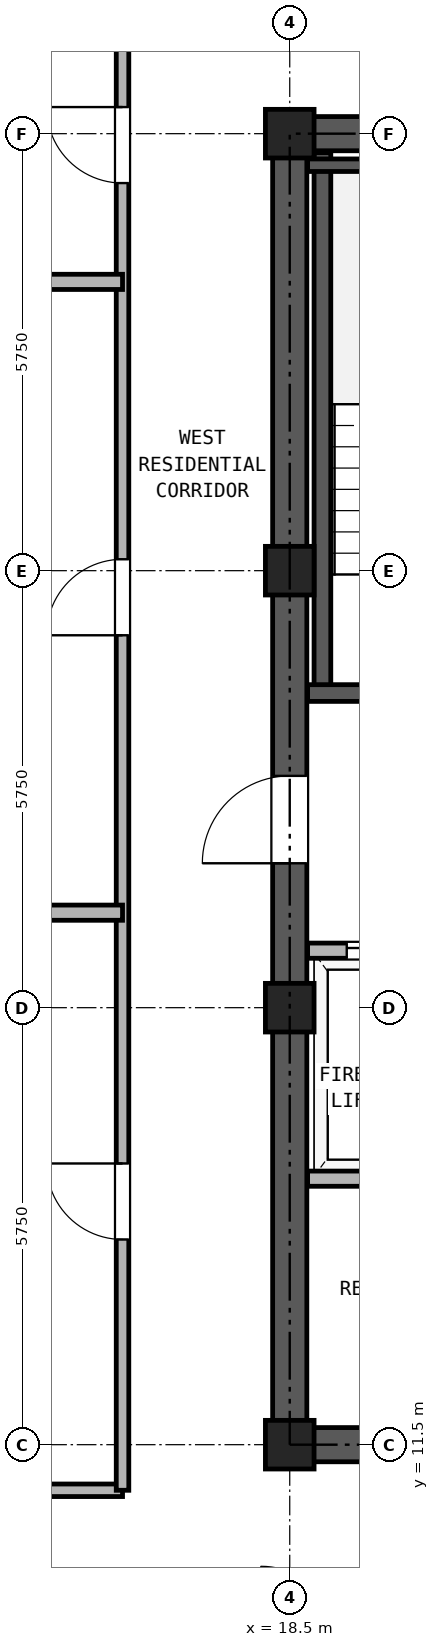
"""IFC4 building model, lengths in metres.
Left out: names, types, materials, properties, quantities, classifications, styles, units other than length and angle.
Written with IfcOpenShell. Run it as: python <this file> out.ifc"""

import sys

from ifc_helpers import new_model, si_unit, direction, frame, frame_2d, origin, origin_2d, place, context, subcontext, project, spatial, rectangle, hollow_rectangle, extrude, source, transform, mapped, element, fill, save


model = new_model("IFC4")
c1 = context("Model", 3, precision=1e-05, world=origin(), true_north=direction((0.0, 1.0)))
c2 = subcontext(c1, "Body", "Model", "MODEL_VIEW")
j1 = project(units=[si_unit("LENGTHUNIT", "METRE"), si_unit("PLANEANGLEUNIT", "RADIAN")], contexts=[c1])
p1 = place(None, origin())
s1 = spatial("IfcSite", under=j1, at=p1, CompositionType="ELEMENT")
p2 = place(p1, origin())
s2 = spatial("IfcBuilding", under=s1, at=p2, CompositionType="ELEMENT")
p3 = place(p2, frame((0.0, 0.0, 159.3)))
s3 = spatial("IfcBuildingStorey", under=s2, at=p3, CompositionType="ELEMENT", Elevation=159.3)
m1 = source(origin(), c2, "Body", "SweptSolid", [
    extrude(hollow_rectangle(XDim=0.64, YDim=0.64, WallThickness=0.035, at=origin_2d()), origin(), (0.0, 0.0, 1.0), 2.95),
])
for number, where, z_axis, x_axis in (
    (1, (18.5, 11.5, 0.0), (0.0, 0.0, 1.0), (1.0, 0.0, 0.0)),
    (2, (18.5, 17.25, 0.0), (0.0, 0.0, 1.0), (1.0, 0.0, 0.0)),
    (3, (18.5, 23.0, 0.0), (0.0, 0.0, 1.0), (1.0, 0.0, 0.0)),
    (4, (18.5, 28.75, 0.0), (0.0, 0.0, 1.0), (1.0, 0.0, 0.0)),
):
    element("IfcColumn", number, at=place(p3, frame(where, z_axis=z_axis, x_axis=x_axis)), inside=s3, PredefinedType="COLUMN", context=c2, shape_type="MappedRepresentation", body=[
        mapped(m1, transform((0.0, 0.0, 0.0), x_axis=(1.0, 0.0, 0.0), y_axis=(0.0, 1.0, 0.0), z_axis=(0.0, 0.0, 1.0), scale=1.0)),
    ])
p4 = place(p3, frame((18.275, 11.5, 0.0), z_axis=(0.0, 0.0, 1.0), x_axis=(1.0, 0.0, 0.0)))
e5 = element("IfcWall", 5, at=p4, inside=s3, PredefinedType="SHEAR", context=c2, shape_type="SweptSolid", body=[
    extrude(rectangle(XDim=10.45, YDim=0.45, at=frame_2d((5.225, 0.0))), origin(), (0.0, 0.0, 1.0), 2.95),
])
p5 = place(p4, frame((1.825, 0.0, 0.0)))
e6 = element("IfcOpeningElement", 6, at=p5, cuts=e5, PredefinedType="OPENING", context=c2, shape_type="SweptSolid", body=[
    extrude(rectangle(XDim=0.95, YDim=2.15, at=frame_2d((0.475, 1.075))), frame((0.0, 0.235, 0.0), z_axis=(0.0, -1.0, 0.0), x_axis=(1.0, 0.0, 0.0)), (0.0, 0.0, 1.0), 0.47),
])
p6 = place(p4, frame((5.325, 0.0, 0.0)))
e7 = element("IfcOpeningElement", 7, at=p6, cuts=e5, PredefinedType="OPENING", context=c2, shape_type="SweptSolid", body=[
    extrude(rectangle(XDim=0.95, YDim=2.15, at=frame_2d((0.475, 1.075))), frame((0.0, 0.235, 0.0), z_axis=(0.0, -1.0, 0.0), x_axis=(1.0, 0.0, 0.0)), (0.0, 0.0, 1.0), 0.47),
])
p7 = place(p4, frame((8.225, 0.0, 0.0)))
e8 = element("IfcOpeningElement", 8, at=p7, cuts=e5, PredefinedType="OPENING", context=c2, shape_type="SweptSolid", body=[
    extrude(rectangle(XDim=1.1, YDim=2.25, at=frame_2d((0.55, 1.125))), frame((0.0, 0.235, 0.0), z_axis=(0.0, -1.0, 0.0), x_axis=(1.0, 0.0, 0.0)), (0.0, 0.0, 1.0), 0.47),
])
p8 = place(p3, frame((18.275, 28.75, 0.0), z_axis=(0.0, 0.0, 1.0), x_axis=(1.0, 0.0, 0.0)))
e9 = element("IfcWall", 9, at=p8, inside=s3, PredefinedType="SHEAR", context=c2, shape_type="SweptSolid", body=[
    extrude(rectangle(XDim=10.45, YDim=0.45, at=frame_2d((5.225, 0.0))), origin(), (0.0, 0.0, 1.0), 2.95),
])
p9 = place(p8, frame((4.105, 0.0, 0.0)))
e10 = element("IfcOpeningElement", 10, at=p9, cuts=e9, PredefinedType="OPENING", context=c2, shape_type="SweptSolid", body=[
    extrude(rectangle(XDim=0.9, YDim=2.05, at=frame_2d((0.45, 1.025))), frame((0.0, 0.235, 0.0), z_axis=(0.0, -1.0, 0.0), x_axis=(1.0, 0.0, 0.0)), (0.0, 0.0, 1.0), 0.47),
])
p10 = place(p8, frame((5.645, 0.0, 0.0)))
e11 = element("IfcOpeningElement", 11, at=p10, cuts=e9, PredefinedType="OPENING", context=c2, shape_type="SweptSolid", body=[
    extrude(rectangle(XDim=0.9, YDim=2.05, at=frame_2d((0.45, 1.025))), frame((0.0, 0.235, 0.0), z_axis=(0.0, -1.0, 0.0), x_axis=(1.0, 0.0, 0.0)), (0.0, 0.0, 1.0), 0.47),
])
p11 = place(p3, frame((18.5, 11.725, 0.0), z_axis=(0.0, 0.0, 1.0), x_axis=(0.0, 1.0, 0.0)))
e12 = element("IfcWall", 12, at=p11, inside=s3, PredefinedType="SHEAR", context=c2, shape_type="SweptSolid", body=[
    extrude(rectangle(XDim=16.8, YDim=0.45, at=frame_2d((8.4, 0.0))), origin(), (0.0, 0.0, 1.0), 2.95),
])
p12 = place(p11, frame((7.425, 0.0, 0.0)))
e13 = element("IfcOpeningElement", 13, at=p12, cuts=e12, PredefinedType="OPENING", context=c2, shape_type="SweptSolid", body=[
    extrude(rectangle(XDim=1.15, YDim=2.2, at=frame_2d((0.575, 1.1))), frame((0.0, 0.235, 0.0), z_axis=(0.0, -1.0, 0.0), x_axis=(1.0, 0.0, 0.0)), (0.0, 0.0, 1.0), 0.47),
])
p13 = place(p3, frame((18.93, 21.39, 0.0), z_axis=(0.0, 0.0, 1.0), x_axis=(0.0, 1.0, 0.0)))
e14 = element("IfcWall", 14, at=p13, inside=s3, PredefinedType="SOLIDWALL", context=c2, shape_type="SweptSolid", body=[
    extrude(rectangle(XDim=7.11, YDim=0.22, at=frame_2d((3.555, 0.0))), origin(), (0.0, 0.0, 1.0), 2.95),
])
p14 = place(p3, frame((18.735, 28.335, 0.0), z_axis=(0.0, 0.0, 1.0), x_axis=(1.0, 0.0, 0.0)))
e15 = element("IfcWall", 15, at=p14, inside=s3, PredefinedType="PARTITIONING", context=c2, shape_type="SweptSolid", body=[
    extrude(rectangle(XDim=3.375, YDim=0.165, at=frame_2d((1.688, 0.0))), origin(), (0.0, 0.0, 1.0), 2.95),
])
p15 = place(p3, frame((18.735, 21.39, 0.0), z_axis=(0.0, 0.0, 1.0), x_axis=(1.0, 0.0, 0.0)))
e16 = element("IfcWall", 16, at=p15, inside=s3, PredefinedType="SOLIDWALL", context=c2, shape_type="SweptSolid", body=[
    extrude(rectangle(XDim=6.395, YDim=0.22, at=frame_2d((3.197, 0.0))), origin(), (0.0, 0.0, 1.0), 2.95),
])
p16 = place(p15, frame((1.115, 0.0, 0.0)))
e17 = element("IfcOpeningElement", 17, at=p16, cuts=e16, PredefinedType="OPENING", context=c2, shape_type="SweptSolid", body=[
    extrude(rectangle(XDim=1.15, YDim=2.2, at=frame_2d((0.575, 1.1))), frame((0.0, 0.12, 0.0), z_axis=(0.0, -1.0, 0.0), x_axis=(1.0, 0.0, 0.0)), (0.0, 0.0, 1.0), 0.24),
])
p17 = place(p15, frame((4.845, 0.0, 0.0)))
e18 = element("IfcOpeningElement", 18, at=p17, cuts=e16, PredefinedType="OPENING", context=c2, shape_type="SweptSolid", body=[
    extrude(rectangle(XDim=1.1, YDim=2.25, at=frame_2d((0.55, 1.125))), frame((0.0, 0.12, 0.0), z_axis=(0.0, -1.0, 0.0), x_axis=(1.0, 0.0, 0.0)), (0.0, 0.0, 1.0), 0.24),
])
p18 = place(p3, frame((18.735, 18.0, 0.0), z_axis=(0.0, 0.0, 1.0), x_axis=(1.0, 0.0, 0.0)))
e19 = element("IfcWall", 19, at=p18, inside=s3, PredefinedType="PARTITIONING", context=c2, shape_type="SweptSolid", body=[
    extrude(rectangle(XDim=9.53, YDim=0.2, at=frame_2d((4.765, 0.0))), origin(), (0.0, 0.0, 1.0), 2.95),
])
p19 = place(p18, frame((0.515, 0.0, 0.0)))
e20 = element("IfcOpeningElement", 20, at=p19, cuts=e19, PredefinedType="OPENING", context=c2, shape_type="SweptSolid", body=[
    extrude(rectangle(XDim=1.3, YDim=2.3, at=frame_2d((0.65, 1.15))), frame((0.0, 0.11, 0.0), z_axis=(0.0, -1.0, 0.0), x_axis=(1.0, 0.0, 0.0)), (0.0, 0.0, 1.0), 0.22),
])
p20 = place(p18, frame((2.615, 0.0, 0.0)))
e21 = element("IfcOpeningElement", 21, at=p20, cuts=e19, PredefinedType="OPENING", context=c2, shape_type="SweptSolid", body=[
    extrude(rectangle(XDim=1.3, YDim=2.3, at=frame_2d((0.65, 1.15))), frame((0.0, 0.11, 0.0), z_axis=(0.0, -1.0, 0.0), x_axis=(1.0, 0.0, 0.0)), (0.0, 0.0, 1.0), 0.22),
])
p21 = place(p18, frame((7.115, 0.0, 0.0)))
e22 = element("IfcOpeningElement", 22, at=p21, cuts=e19, PredefinedType="OPENING", context=c2, shape_type="SweptSolid", body=[
    extrude(rectangle(XDim=1.0, YDim=2.15, at=frame_2d((0.5, 1.075))), frame((0.0, 0.11, 0.0), z_axis=(0.0, -1.0, 0.0), x_axis=(1.0, 0.0, 0.0)), (0.0, 0.0, 1.0), 0.22),
])
p22 = place(p3, frame((18.735, 15.0, 0.0), z_axis=(0.0, 0.0, 1.0), x_axis=(1.0, 0.0, 0.0)))
e23 = element("IfcWall", 23, at=p22, inside=s3, PredefinedType="PARTITIONING", context=c2, shape_type="SweptSolid", body=[
    extrude(rectangle(XDim=9.53, YDim=0.2, at=frame_2d((4.765, 0.0))), origin(), (0.0, 0.0, 1.0), 2.95),
])
p23 = place(p3, frame((7.6, 10.9, 0.0), z_axis=(0.0, 0.0, 1.0), x_axis=(1.0, 0.0, 0.0)))
e24 = element("IfcWall", 24, at=p23, inside=s3, PredefinedType="PARTITIONING", context=c2, shape_type="SweptSolid", body=[
    extrude(rectangle(XDim=8.7, YDim=0.165, at=frame_2d((4.35, 0.0))), origin(), (0.0, 0.0, 1.0), 2.95),
])
p24 = place(p3, frame((16.3, 10.9, 0.0), z_axis=(0.0, 0.0, 1.0), x_axis=(0.0, 1.0, 0.0)))
e25 = element("IfcWall", 25, at=p24, inside=s3, PredefinedType="PARTITIONING", context=c2, shape_type="SweptSolid", body=[
    extrude(rectangle(XDim=24.24, YDim=0.165, at=frame_2d((12.12, 0.0))), origin(), (0.0, 0.0, 1.0), 2.95),
])
p25 = place(p24, frame((3.3, 0.0, 0.0)))
e26 = element("IfcOpeningElement", 26, at=p25, cuts=e25, PredefinedType="OPENING", context=c2, shape_type="SweptSolid", body=[
    extrude(rectangle(XDim=1.0, YDim=2.15, at=frame_2d((0.5, 1.075))), frame((0.0, 0.093, 0.0), z_axis=(0.0, -1.0, 0.0), x_axis=(1.0, 0.0, 0.0)), (0.0, 0.0, 1.0), 0.185),
])
p26 = place(p24, frame((11.25, 0.0, 0.0)))
e27 = element("IfcOpeningElement", 27, at=p26, cuts=e25, PredefinedType="OPENING", context=c2, shape_type="SweptSolid", body=[
    extrude(rectangle(XDim=1.0, YDim=2.15, at=frame_2d((0.5, 1.075))), frame((0.0, 0.093, 0.0), z_axis=(0.0, -1.0, 0.0), x_axis=(1.0, 0.0, 0.0)), (0.0, 0.0, 1.0), 0.185),
])
p27 = place(p24, frame((17.2, 0.0, 0.0)))
e28 = element("IfcOpeningElement", 28, at=p27, cuts=e25, PredefinedType="OPENING", context=c2, shape_type="SweptSolid", body=[
    extrude(rectangle(XDim=1.0, YDim=2.15, at=frame_2d((0.5, 1.075))), frame((0.0, 0.093, 0.0), z_axis=(0.0, -1.0, 0.0), x_axis=(1.0, 0.0, 0.0)), (0.0, 0.0, 1.0), 0.185),
])
for number, where, z_axis, x_axis in (
    (29, (0.16, 18.5, 0.0), (0.0, 0.0, 1.0), (1.0, 0.0, 0.0)),
    (30, (0.16, 26.8, 0.0), (0.0, 0.0, 1.0), (1.0, 0.0, 0.0)),
):
    element("IfcWall", number, at=place(p3, frame(where, z_axis=z_axis, x_axis=x_axis)), inside=s3, PredefinedType="PARTITIONING", context=c2, shape_type="SweptSolid", body=[
        extrude(rectangle(XDim=16.14, YDim=0.2, at=frame_2d((8.07, 0.0))), origin(), (0.0, 0.0, 1.0), 2.95),
    ])
p28 = place(p19, origin())
e31 = element("IfcDoor", 31, at=p28, inside=s3, OperationType="DOUBLE_DOOR_SLIDING", PredefinedType="DOOR", context=c2, shape_type="SweptSolid", body=[
    extrude(rectangle(XDim=1.3, YDim=2.3, at=frame_2d((0.65, 1.15))), frame((0.0, 0.025, 0.0), z_axis=(0.0, -1.0, 0.0), x_axis=(1.0, 0.0, 0.0)), (0.0, 0.0, 1.0), 0.05),
])
fill(e20, e31)
p29 = place(p12, frame((1.15, 0.0, 0.0), z_axis=(0.0, 0.0, 1.0), x_axis=(-1.0, 0.0, 0.0)))
e32 = element("IfcDoor", 32, at=p29, inside=s3, OperationType="SINGLE_SWING_LEFT", PredefinedType="DOOR", context=c2, shape_type="SweptSolid", body=[
    extrude(rectangle(XDim=1.15, YDim=2.2, at=frame_2d((0.575, 1.1))), frame((0.0, 0.025, 0.0), z_axis=(0.0, -1.0, 0.0), x_axis=(1.0, 0.0, 0.0)), (0.0, 0.0, 1.0), 0.05),
])
fill(e13, e32)
p30 = place(p25, origin())
e33 = element("IfcDoor", 33, at=p30, inside=s3, OperationType="SINGLE_SWING_RIGHT", PredefinedType="DOOR", context=c2, shape_type="SweptSolid", body=[
    extrude(rectangle(XDim=1.0, YDim=2.15, at=frame_2d((0.5, 1.075))), frame((0.0, 0.025, 0.0), z_axis=(0.0, -1.0, 0.0), x_axis=(1.0, 0.0, 0.0)), (0.0, 0.0, 1.0), 0.05),
])
fill(e26, e33)
p31 = place(p26, origin())
e34 = element("IfcDoor", 34, at=p31, inside=s3, OperationType="SINGLE_SWING_LEFT", PredefinedType="DOOR", context=c2, shape_type="SweptSolid", body=[
    extrude(rectangle(XDim=1.0, YDim=2.15, at=frame_2d((0.5, 1.075))), frame((0.0, 0.025, 0.0), z_axis=(0.0, -1.0, 0.0), x_axis=(1.0, 0.0, 0.0)), (0.0, 0.0, 1.0), 0.05),
])
fill(e27, e34)
p32 = place(p27, origin())
e35 = element("IfcDoor", 35, at=p32, inside=s3, OperationType="SINGLE_SWING_RIGHT", PredefinedType="DOOR", context=c2, shape_type="SweptSolid", body=[
    extrude(rectangle(XDim=1.0, YDim=2.15, at=frame_2d((0.5, 1.075))), frame((0.0, 0.025, 0.0), z_axis=(0.0, -1.0, 0.0), x_axis=(1.0, 0.0, 0.0)), (0.0, 0.0, 1.0), 0.05),
])
fill(e28, e35)
save(model, sys.argv[1])
